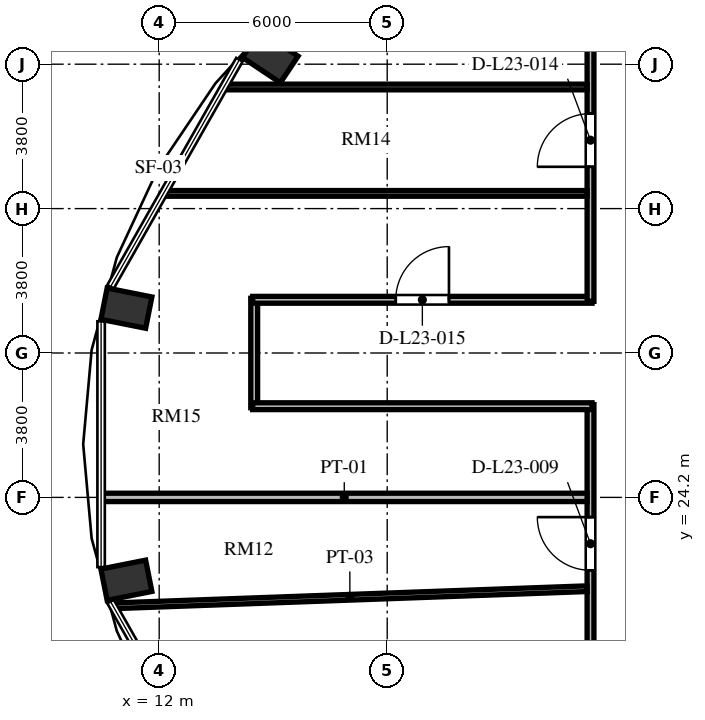
"""IFC4 building model, lengths in metres.
Left out: names, types, materials, properties, quantities, classifications, styles, units other than length and angle.
Written with IfcOpenShell. Run it as: python <this file> out.ifc"""

import sys

from ifc_helpers import new_model, si_unit, direction, frame, frame_2d, origin, origin_2d, place, context, subcontext, project, spatial, rectangle, extrude, element, fill, save


model = new_model("IFC4")
c1 = context("Model", 3, precision=1e-05, world=origin(), true_north=direction((0.0, 1.0)))
c2 = subcontext(c1, "Body", "Model", "MODEL_VIEW")
j1 = project(units=[si_unit("LENGTHUNIT", "METRE"), si_unit("PLANEANGLEUNIT", "RADIAN")], contexts=[c1])
p1 = place(None, origin())
s1 = spatial("IfcSite", under=j1, at=p1, CompositionType="ELEMENT")
p2 = place(p1, origin())
s2 = spatial("IfcBuilding", under=s1, at=p2, CompositionType="ELEMENT")
p3 = place(p2, frame((0.0, 0.0, 92.688)))
s3 = spatial("IfcBuildingStorey", under=s2, at=p3, CompositionType="ELEMENT", Elevation=92.688)
for number, where, z_axis, x_axis in (
    (1, (14.922, 35.795, 0.0), (0.0, 0.0, 1.0), (-0.831, 0.556, 0.0)),
    (2, (11.137, 29.18, 0.0), (0.0, 0.0, 1.0), (-0.981, 0.195, 0.0)),
    (3, (11.137, 22.02, 0.0), (0.0, 0.0, 1.0), (-0.981, -0.195, 0.0)),
):
    element("IfcColumn", number, at=place(p3, frame(where, z_axis=z_axis, x_axis=x_axis)), inside=s3, PredefinedType="COLUMN", context=c2, shape_type="SweptSolid", body=[
        extrude(rectangle(XDim=1.2, YDim=0.84, at=origin_2d()), origin(), (0.0, 0.0, 1.0), 3.648),
    ])
p4 = place(p3, frame((14.5, 26.56, 0.0), z_axis=(0.0, 0.0, 1.0), x_axis=(0.0, 1.0, 0.0)))
e4 = element("IfcWall", 4, at=p4, inside=s3, PredefinedType="PARTITIONING", context=c2, shape_type="SweptSolid", body=[
    extrude(rectangle(XDim=2.88, YDim=0.18, at=frame_2d((1.44, 0.0))), origin(), (0.0, 0.0, 1.0), 3.013),
])
p5 = place(p3, frame((14.46, 29.4, 0.0), z_axis=(0.0, 0.0, 1.0), x_axis=(1.0, 0.0, 0.0)))
e5 = element("IfcWall", 5, at=p5, inside=s3, PredefinedType="PARTITIONING", context=c2, shape_type="SweptSolid", body=[
    extrude(rectangle(XDim=8.93, YDim=0.18, at=frame_2d((4.465, 0.0))), origin(), (0.0, 0.0, 1.0), 3.428),
])
p6 = place(p5, frame((3.765, 0.0, 0.0)))
e6 = element("IfcOpeningElement", 6, at=p6, cuts=e5, PredefinedType="OPENING", context=c2, shape_type="SweptSolid", body=[
    extrude(rectangle(XDim=1.4, YDim=2.2, at=frame_2d((0.7, 1.1))), frame((0.0, 0.1, 0.0), z_axis=(0.0, -1.0, 0.0), x_axis=(1.0, 0.0, 0.0)), (0.0, 0.0, 1.0), 0.2),
])
p7 = place(p3, frame((23.35, 29.36, 0.0), z_axis=(0.0, 0.0, 1.0), x_axis=(0.0, 1.0, 0.0)))
e7 = element("IfcWall", 7, at=p7, inside=s3, PredefinedType="PARTITIONING", context=c2, shape_type="SweptSolid", body=[
    extrude(rectangle(XDim=9.43, YDim=0.18, at=frame_2d((4.715, 0.0))), origin(), (0.0, 0.0, 1.0), 3.428),
])
p8 = place(p7, frame((3.54, 0.0, 0.0)))
e8 = element("IfcOpeningElement", 8, at=p8, cuts=e7, PredefinedType="OPENING", context=c2, shape_type="SweptSolid", body=[
    extrude(rectangle(XDim=1.4, YDim=2.2, at=frame_2d((0.7, 1.1))), frame((0.0, 0.1, 0.0), z_axis=(0.0, -1.0, 0.0), x_axis=(1.0, 0.0, 0.0)), (0.0, 0.0, 1.0), 0.2),
])
p9 = place(p3, frame((23.35, 17.36, 0.0), z_axis=(0.0, 0.0, 1.0), x_axis=(0.0, 1.0, 0.0)))
e9 = element("IfcWall", 9, at=p9, inside=s3, PredefinedType="PARTITIONING", context=c2, shape_type="SweptSolid", body=[
    extrude(rectangle(XDim=9.28, YDim=0.18, at=frame_2d((4.64, 0.0))), origin(), (0.0, 0.0, 1.0), 3.428),
])
p10 = place(p9, frame((4.921, 0.0, 0.0)))
e10 = element("IfcOpeningElement", 10, at=p10, cuts=e9, PredefinedType="OPENING", context=c2, shape_type="SweptSolid", body=[
    extrude(rectangle(XDim=1.4, YDim=2.2, at=frame_2d((0.7, 1.1))), frame((0.0, 0.1, 0.0), z_axis=(0.0, -1.0, 0.0), x_axis=(1.0, 0.0, 0.0)), (0.0, 0.0, 1.0), 0.2),
])
p11 = place(p3, frame((23.39, 26.6, 0.0), z_axis=(0.0, 0.0, 1.0), x_axis=(-1.0, 0.0, 0.0)))
e11 = element("IfcWall", 11, at=p11, inside=s3, PredefinedType="PARTITIONING", context=c2, shape_type="SweptSolid", body=[
    extrude(rectangle(XDim=8.93, YDim=0.18, at=frame_2d((4.465, 0.0))), origin(), (0.0, 0.0, 1.0), 3.428),
])
p12 = place(p3, frame((10.774, 21.346, 0.0), z_axis=(0.0, 0.0, 1.0), x_axis=(0.999347780952, 0.036111116092, 0.0)))
e12 = element("IfcWall", 12, at=p12, inside=s3, PredefinedType="PARTITIONING", context=c2, shape_type="SweptSolid", body=[
    extrude(rectangle(XDim=12.494, YDim=0.15, at=frame_2d((6.247, 0.0))), origin(), (0.0, 0.0, 1.0), 2.813),
])
p13 = place(p3, frame((10.48, 24.2, 0.0), z_axis=(0.0, 0.0, 1.0), x_axis=(1.0, 0.0, 0.0)))
e13 = element("IfcWall", 13, at=p13, inside=s3, PredefinedType="PARTITIONING", context=c2, shape_type="SweptSolid", body=[
    extrude(rectangle(XDim=12.78, YDim=0.22, at=frame_2d((6.39, 0.0))), origin(), (0.0, 0.0, 1.0), 3.428),
])
p14 = place(p3, frame((12.121, 32.2, 0.0), z_axis=(0.0, 0.0, 1.0), x_axis=(1.0, 0.0, 0.0)))
e14 = element("IfcWall", 14, at=p14, inside=s3, PredefinedType="PARTITIONING", context=c2, shape_type="SweptSolid", body=[
    extrude(rectangle(XDim=11.139, YDim=0.15, at=frame_2d((5.57, 0.0))), origin(), (0.0, 0.0, 1.0), 3.428),
])
p15 = place(p3, frame((13.71, 35.0, 0.0), z_axis=(0.0, 0.0, 1.0), x_axis=(1.0, 0.0, 0.0)))
e15 = element("IfcWall", 15, at=p15, inside=s3, PredefinedType="PARTITIONING", context=c2, shape_type="SweptSolid", body=[
    extrude(rectangle(XDim=9.55, YDim=0.15, at=frame_2d((4.775, 0.0))), origin(), (0.0, 0.0, 1.0), 3.428),
])
p16 = place(p10, origin())
e16 = element("IfcDoor", 16, at=p16, inside=s3, OperationType="SINGLE_SWING_RIGHT", PredefinedType="DOOR", context=c2, shape_type="SweptSolid", body=[
    extrude(rectangle(XDim=1.4, YDim=2.2, at=frame_2d((0.7, 1.1))), frame((0.0, 0.025, 0.0), z_axis=(0.0, -1.0, 0.0), x_axis=(1.0, 0.0, 0.0)), (0.0, 0.0, 1.0), 0.05),
])
fill(e10, e16)
p17 = place(p8, origin())
e17 = element("IfcDoor", 17, at=p17, inside=s3, OperationType="SINGLE_SWING_LEFT", PredefinedType="DOOR", context=c2, shape_type="SweptSolid", body=[
    extrude(rectangle(XDim=1.4, YDim=2.2, at=frame_2d((0.7, 1.1))), frame((0.0, 0.025, 0.0), z_axis=(0.0, -1.0, 0.0), x_axis=(1.0, 0.0, 0.0)), (0.0, 0.0, 1.0), 0.05),
])
fill(e8, e17)
p18 = place(p6, origin())
e18 = element("IfcDoor", 18, at=p18, inside=s3, OperationType="SINGLE_SWING_RIGHT", PredefinedType="DOOR", context=c2, shape_type="SweptSolid", body=[
    extrude(rectangle(XDim=1.4, YDim=2.2, at=frame_2d((0.7, 1.1))), frame((0.0, 0.025, 0.0), z_axis=(0.0, -1.0, 0.0), x_axis=(1.0, 0.0, 0.0)), (0.0, 0.0, 1.0), 0.05),
])
fill(e6, e18)
save(model, sys.argv[1])
